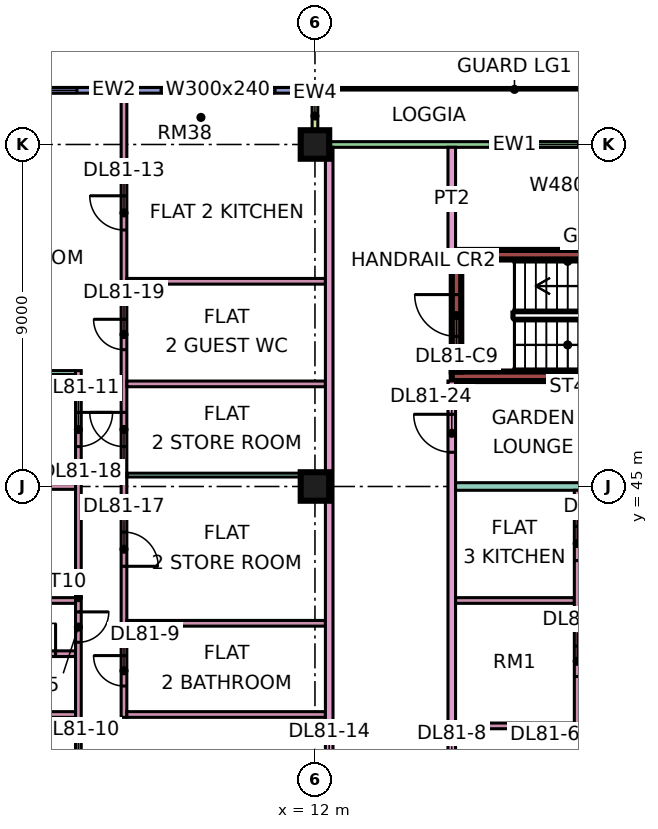
"""IFC4 building model, lengths in metres.
Left out: names, types, materials, properties, quantities, classifications, styles, units other than length and angle.
Written with IfcOpenShell. Run it as: python <this file> out.ifc"""

import sys

from ifc_helpers import new_model, si_unit, direction, frame, frame_2d, origin, origin_2d, place, context, subcontext, project, spatial, rectangle, extrude, element, fill, save


model = new_model("IFC4")
c1 = context("Model", 3, precision=1e-05, world=origin(), true_north=direction((0.0, 1.0)))
c2 = subcontext(c1, "Body", "Model", "MODEL_VIEW")
j1 = project(units=[si_unit("LENGTHUNIT", "METRE"), si_unit("PLANEANGLEUNIT", "RADIAN")], contexts=[c1])
p1 = place(None, origin())
s1 = spatial("IfcSite", under=j1, at=p1, CompositionType="ELEMENT")
p2 = place(p1, origin())
s2 = spatial("IfcBuilding", under=s1, at=p2, CompositionType="ELEMENT")
p3 = place(p2, frame((0.0, 0.0, 350.15)))
s3 = spatial("IfcBuildingStorey", under=s2, at=p3, CompositionType="ELEMENT", Elevation=350.15)
for number, where, z_axis, x_axis in (
    (1, (12.0, 45.0, 0.0), (0.0, 0.0, 1.0), (1.0, 0.0, 0.0)),
    (2, (12.0, 54.0, 0.0), (0.0, 0.0, 1.0), (1.0, 0.0, 0.0)),
):
    element("IfcColumn", number, at=place(p3, frame(where, z_axis=z_axis, x_axis=x_axis)), inside=s3, PredefinedType="COLUMN", context=c2, shape_type="SweptSolid", body=[
        extrude(rectangle(XDim=0.75, YDim=0.75, at=origin_2d()), origin(), (0.0, 0.0, 1.0), 3.75),
    ])
for number, where, z_axis, x_axis in (
    (3, (15.6, 47.9, 0.0), (0.0, 0.0, 1.0), (1.0, 0.0, 0.0)),
    (4, (15.6, 51.1, 0.0), (0.0, 0.0, 1.0), (1.0, 0.0, 0.0)),
):
    element("IfcWall", number, at=place(p3, frame(where, z_axis=z_axis, x_axis=x_axis)), inside=s3, PredefinedType="SHEAR", context=c2, shape_type="SweptSolid", body=[
        extrude(rectangle(XDim=7.0, YDim=0.25, at=frame_2d((3.5, 0.0))), origin(), (0.0, 0.0, 1.0), 3.75),
    ])
p4 = place(p3, frame((15.725, 48.025, 0.0), z_axis=(0.0, 0.0, 1.0), x_axis=(0.0, 1.0, 0.0)))
e5 = element("IfcWall", 5, at=p4, inside=s3, PredefinedType="SHEAR", context=c2, shape_type="SweptSolid", body=[
    extrude(rectangle(XDim=2.95, YDim=0.25, at=frame_2d((1.475, 0.0))), origin(), (0.0, 0.0, 1.0), 3.75),
])
p5 = place(p4, frame((0.925, 0.0, 0.0)))
e6 = element("IfcOpeningElement", 6, at=p5, cuts=e5, PredefinedType="OPENING", context=c2, shape_type="SweptSolid", body=[
    extrude(rectangle(XDim=1.1, YDim=2.2, at=frame_2d((0.55, 1.1))), frame((0.0, 0.135, 0.0), z_axis=(0.0, -1.0, 0.0), x_axis=(1.0, 0.0, 0.0)), (0.0, 0.0, 1.0), 0.27),
])
p6 = place(p3, frame((22.425, 54.0, 0.0), z_axis=(0.0, 0.0, 1.0), x_axis=(-1.0, 0.0, 0.0)))
e7 = element("IfcWall", 7, at=p6, inside=s3, PredefinedType="SOLIDWALL", context=c2, shape_type="SweptSolid", body=[
    extrude(rectangle(XDim=10.35, YDim=0.15, at=frame_2d((5.175, 0.0))), origin(), (0.0, 0.0, 1.0), 3.35),
])
p7 = place(p6, frame((1.012, 0.0, 0.45)))
e8 = element("IfcOpeningElement", 8, at=p7, cuts=e7, PredefinedType="OPENING", context=c2, shape_type="SweptSolid", body=[
    extrude(rectangle(XDim=4.8, YDim=2.4, at=frame_2d((2.4, 1.2))), frame((0.0, 0.085, 0.0), z_axis=(0.0, -1.0, 0.0), x_axis=(1.0, 0.0, 0.0)), (0.0, 0.0, 1.0), 0.17),
])
p8 = place(p3, frame((12.0, 55.5, 0.0), z_axis=(0.0, 0.0, 1.0), x_axis=(0.0, -1.0, 0.0)))
e9 = element("IfcWall", 9, at=p8, inside=s3, PredefinedType="SOLIDWALL", context=c2, shape_type="SweptSolid", body=[
    extrude(rectangle(XDim=1.5, YDim=0.15, at=frame_2d((0.75, 0.0))), origin(), (0.0, 0.0, 1.0), 3.35),
])
p9 = place(p3, frame((11.925, 55.425, 0.0), z_axis=(0.0, 0.0, 1.0), x_axis=(-1.0, 0.0, 0.0)))
e10 = element("IfcWall", 10, at=p9, inside=s3, PredefinedType="SOLIDWALL", context=c2, shape_type="SweptSolid", body=[
    extrude(rectangle(XDim=10.425, YDim=0.15, at=frame_2d((5.212, 0.0))), origin(), (0.0, 0.0, 1.0), 3.35),
])
p10 = place(p9, frame((0.975, 0.0, 0.45)))
e11 = element("IfcOpeningElement", 11, at=p10, cuts=e10, PredefinedType="OPENING", context=c2, shape_type="SweptSolid", body=[
    extrude(rectangle(XDim=3.0, YDim=2.4, at=frame_2d((1.5, 1.2))), frame((0.0, 0.085, 0.0), z_axis=(0.0, -1.0, 0.0), x_axis=(1.0, 0.0, 0.0)), (0.0, 0.0, 1.0), 0.17),
])
p11 = place(p9, frame((6.188, 0.0, 0.45)))
e12 = element("IfcOpeningElement", 12, at=p11, cuts=e10, PredefinedType="OPENING", context=c2, shape_type="SweptSolid", body=[
    extrude(rectangle(XDim=3.0, YDim=2.4, at=frame_2d((1.5, 1.2))), frame((0.0, 0.085, 0.0), z_axis=(0.0, -1.0, 0.0), x_axis=(1.0, 0.0, 0.0)), (0.0, 0.0, 1.0), 0.17),
])
p12 = place(p3, frame((0.0, 48.0, 0.0), z_axis=(0.0, 0.0, 1.0), x_axis=(1.0, 0.0, 0.0)))
e13 = element("IfcWall", 13, at=p12, inside=s3, PredefinedType="PARTITIONING", context=c2, shape_type="SweptSolid", body=[
    extrude(rectangle(XDim=5.7, YDim=0.1, at=frame_2d((2.85, 0.0))), origin(), (0.0, 0.0, 1.0), 3.35),
])
for number, where, z_axis, x_axis in (
    (14, (0.074, 39.0, 0.0), (0.0, 0.0, 1.0), (1.0, 0.0, 0.0)),
    (15, (0.074, 42.0, 0.0), (0.0, 0.0, 1.0), (1.0, 0.0, 0.0)),
):
    element("IfcWall", number, at=place(p3, frame(where, z_axis=z_axis, x_axis=x_axis)), inside=s3, PredefinedType="PARTITIONING", context=c2, shape_type="SweptSolid", body=[
        extrude(rectangle(XDim=5.626, YDim=0.15, at=frame_2d((2.813, 0.0))), origin(), (0.0, 0.0, 1.0), 3.35),
    ])
p13 = place(p3, frame((3.375, 45.0, 0.0), z_axis=(0.0, 0.0, 1.0), x_axis=(1.0, 0.0, 0.0)))
e16 = element("IfcWall", 16, at=p13, inside=s3, PredefinedType="PARTITIONING", context=c2, shape_type="SweptSolid", body=[
    extrude(rectangle(XDim=2.325, YDim=0.15, at=frame_2d((1.163, 0.0))), origin(), (0.0, 0.0, 1.0), 3.35),
])
p14 = place(p3, frame((3.7, 40.6, 0.0), z_axis=(0.0, 0.0, 1.0), x_axis=(1.0, 0.0, 0.0)))
e17 = element("IfcWall", 17, at=p14, inside=s3, PredefinedType="PARTITIONING", context=c2, shape_type="SweptSolid", body=[
    extrude(rectangle(XDim=2.0, YDim=0.15, at=frame_2d((1.0, 0.0))), origin(), (0.0, 0.0, 1.0), 3.35),
])
p15 = place(p14, frame((0.675, 0.0, 0.0)))
e18 = element("IfcOpeningElement", 18, at=p15, cuts=e17, PredefinedType="OPENING", context=c2, shape_type="SweptSolid", body=[
    extrude(rectangle(XDim=0.8, YDim=2.1, at=frame_2d((0.4, 1.05))), frame((0.0, 0.085, 0.0), z_axis=(0.0, -1.0, 0.0), x_axis=(1.0, 0.0, 0.0)), (0.0, 0.0, 1.0), 0.17),
])
p16 = place(p3, frame((5.775, 36.1, 0.0), z_axis=(0.0, 0.0, 1.0), x_axis=(0.0, 1.0, 0.0)))
e19 = element("IfcWall", 19, at=p16, inside=s3, PredefinedType="PARTITIONING", context=c2, shape_type="SweptSolid", body=[
    extrude(rectangle(XDim=11.95, YDim=0.15, at=frame_2d((5.975, 0.0))), origin(), (0.0, 0.0, 1.0), 3.35),
])
p17 = place(p16, frame((0.95, 0.0, 0.0)))
e20 = element("IfcOpeningElement", 20, at=p17, cuts=e19, PredefinedType="OPENING", context=c2, shape_type="SweptSolid", body=[
    extrude(rectangle(XDim=0.9, YDim=2.1, at=frame_2d((0.45, 1.05))), frame((0.0, 0.085, 0.0), z_axis=(0.0, -1.0, 0.0), x_axis=(1.0, 0.0, 0.0)), (0.0, 0.0, 1.0), 0.17),
])
p18 = place(p16, frame((9.95, 0.0, 0.0)))
e21 = element("IfcOpeningElement", 21, at=p18, cuts=e19, PredefinedType="OPENING", context=c2, shape_type="SweptSolid", body=[
    extrude(rectangle(XDim=0.9, YDim=2.1, at=frame_2d((0.45, 1.05))), frame((0.0, 0.085, 0.0), z_axis=(0.0, -1.0, 0.0), x_axis=(1.0, 0.0, 0.0)), (0.0, 0.0, 1.0), 0.17),
])
p19 = place(p16, frame((4.8, 0.0, 0.0)))
e22 = element("IfcOpeningElement", 22, at=p19, cuts=e19, PredefinedType="OPENING", context=c2, shape_type="SweptSolid", body=[
    extrude(rectangle(XDim=0.8, YDim=2.1, at=frame_2d((0.4, 1.05))), frame((0.0, 0.085, 0.0), z_axis=(0.0, -1.0, 0.0), x_axis=(1.0, 0.0, 0.0)), (0.0, 0.0, 1.0), 0.17),
])
p20 = place(p3, frame((6.975, 38.925, 0.0), z_axis=(0.0, 0.0, 1.0), x_axis=(0.0, 1.0, 0.0)))
e23 = element("IfcWall", 23, at=p20, inside=s3, PredefinedType="PARTITIONING", context=c2, shape_type="SweptSolid", body=[
    extrude(rectangle(XDim=16.425, YDim=0.15, at=frame_2d((8.212, 0.0))), origin(), (0.0, 0.0, 1.0), 3.35),
])
p21 = place(p20, frame((0.825, 0.0, 0.0)))
e24 = element("IfcOpeningElement", 24, at=p21, cuts=e23, PredefinedType="OPENING", context=c2, shape_type="SweptSolid", body=[
    extrude(rectangle(XDim=0.8, YDim=2.1, at=frame_2d((0.4, 1.05))), frame((0.0, 0.085, 0.0), z_axis=(0.0, -1.0, 0.0), x_axis=(1.0, 0.0, 0.0)), (0.0, 0.0, 1.0), 0.17),
])
p22 = place(p20, frame((12.825, 0.0, 0.0)))
e25 = element("IfcOpeningElement", 25, at=p22, cuts=e23, PredefinedType="OPENING", context=c2, shape_type="SweptSolid", body=[
    extrude(rectangle(XDim=0.9, YDim=2.1, at=frame_2d((0.45, 1.05))), frame((0.0, 0.085, 0.0), z_axis=(0.0, -1.0, 0.0), x_axis=(1.0, 0.0, 0.0)), (0.0, 0.0, 1.0), 0.17),
])
p23 = place(p20, frame((3.975, 0.0, 0.0)))
e26 = element("IfcOpeningElement", 26, at=p23, cuts=e23, PredefinedType="OPENING", context=c2, shape_type="SweptSolid", body=[
    extrude(rectangle(XDim=0.9, YDim=2.1, at=frame_2d((0.45, 1.05))), frame((0.0, 0.085, 0.0), z_axis=(0.0, -1.0, 0.0), x_axis=(1.0, 0.0, 0.0)), (0.0, 0.0, 1.0), 0.17),
])
p24 = place(p20, frame((7.125, 0.0, 0.0)))
e27 = element("IfcOpeningElement", 27, at=p24, cuts=e23, PredefinedType="OPENING", context=c2, shape_type="SweptSolid", body=[
    extrude(rectangle(XDim=0.9, YDim=2.1, at=frame_2d((0.45, 1.05))), frame((0.0, 0.085, 0.0), z_axis=(0.0, -1.0, 0.0), x_axis=(1.0, 0.0, 0.0)), (0.0, 0.0, 1.0), 0.17),
])
p25 = place(p20, frame((9.675, 0.0, 0.0)))
e28 = element("IfcOpeningElement", 28, at=p25, cuts=e23, PredefinedType="OPENING", context=c2, shape_type="SweptSolid", body=[
    extrude(rectangle(XDim=0.8, YDim=2.1, at=frame_2d((0.4, 1.05))), frame((0.0, 0.085, 0.0), z_axis=(0.0, -1.0, 0.0), x_axis=(1.0, 0.0, 0.0)), (0.0, 0.0, 1.0), 0.17),
])
for number, where, z_axis, x_axis in (
    (29, (7.05, 39.0, 0.0), (0.0, 0.0, 1.0), (1.0, 0.0, 0.0)),
    (30, (7.05, 41.4, 0.0), (0.0, 0.0, 1.0), (1.0, 0.0, 0.0)),
):
    element("IfcWall", number, at=place(p3, frame(where, z_axis=z_axis, x_axis=x_axis)), inside=s3, PredefinedType="PARTITIONING", context=c2, shape_type="SweptSolid", body=[
        extrude(rectangle(XDim=5.225, YDim=0.15, at=frame_2d((2.612, 0.0))), origin(), (0.0, 0.0, 1.0), 3.35),
    ])
p26 = place(p3, frame((7.05, 45.3, 0.0), z_axis=(0.0, 0.0, 1.0), x_axis=(1.0, 0.0, 0.0)))
e31 = element("IfcWall", 31, at=p26, inside=s3, PredefinedType="PARTITIONING", context=c2, shape_type="SweptSolid", body=[
    extrude(rectangle(XDim=5.225, YDim=0.1, at=frame_2d((2.612, 0.0))), origin(), (0.0, 0.0, 1.0), 3.35),
])
for number, where, z_axis, x_axis in (
    (32, (7.05, 47.7, 0.0), (0.0, 0.0, 1.0), (1.0, 0.0, 0.0)),
    (33, (7.05, 50.4, 0.0), (0.0, 0.0, 1.0), (1.0, 0.0, 0.0)),
):
    element("IfcWall", number, at=place(p3, frame(where, z_axis=z_axis, x_axis=x_axis)), inside=s3, PredefinedType="PARTITIONING", context=c2, shape_type="SweptSolid", body=[
        extrude(rectangle(XDim=5.225, YDim=0.15, at=frame_2d((2.612, 0.0))), origin(), (0.0, 0.0, 1.0), 3.35),
    ])
p27 = place(p3, frame((12.375, 20.0, 0.0), z_axis=(0.0, 0.0, 1.0), x_axis=(0.0, 1.0, 0.0)))
e34 = element("IfcWall", 34, at=p27, inside=s3, PredefinedType="PARTITIONING", context=c2, shape_type="SweptSolid", body=[
    extrude(rectangle(XDim=33.926, YDim=0.2, at=frame_2d((16.963, 0.0))), origin(), (0.0, 0.0, 1.0), 3.35),
])
p28 = place(p27, frame((16.95, 0.0, 0.0)))
e35 = element("IfcOpeningElement", 35, at=p28, cuts=e34, PredefinedType="OPENING", context=c2, shape_type="SweptSolid", body=[
    extrude(rectangle(XDim=1.0, YDim=2.1, at=frame_2d((0.5, 1.05))), frame((0.0, 0.11, 0.0), z_axis=(0.0, -1.0, 0.0), x_axis=(1.0, 0.0, 0.0)), (0.0, 0.0, 1.0), 0.22),
])
p29 = place(p27, frame((0.6, 0.0, 0.0)))
e36 = element("IfcOpeningElement", 36, at=p29, cuts=e34, PredefinedType="OPENING", context=c2, shape_type="SweptSolid", body=[
    extrude(rectangle(XDim=1.2, YDim=2.1, at=frame_2d((0.6, 1.05))), frame((0.0, 0.11, 0.0), z_axis=(0.0, -1.0, 0.0), x_axis=(1.0, 0.0, 0.0)), (0.0, 0.0, 1.0), 0.22),
])
p30 = place(p27, frame((14.25, 0.0, 0.0)))
e37 = element("IfcOpeningElement", 37, at=p30, cuts=e34, PredefinedType="OPENING", context=c2, shape_type="SweptSolid", body=[
    extrude(rectangle(XDim=1.0, YDim=2.1, at=frame_2d((0.5, 1.05))), frame((0.0, 0.11, 0.0), z_axis=(0.0, -1.0, 0.0), x_axis=(1.0, 0.0, 0.0)), (0.0, 0.0, 1.0), 0.22),
])
p31 = place(p3, frame((15.6, 20.0, 0.0), z_axis=(0.0, 0.0, 1.0), x_axis=(0.0, 1.0, 0.0)))
e38 = element("IfcWall", 38, at=p31, inside=s3, PredefinedType="PARTITIONING", context=c2, shape_type="SweptSolid", body=[
    extrude(rectangle(XDim=27.775, YDim=0.2, at=frame_2d((13.887, 0.0))), origin(), (0.0, 0.0, 1.0), 3.35),
])
p32 = place(p31, frame((6.7, 0.0, 0.0)))
e39 = element("IfcOpeningElement", 39, at=p32, cuts=e38, PredefinedType="OPENING", context=c2, shape_type="SweptSolid", body=[
    extrude(rectangle(XDim=1.6, YDim=2.1, at=frame_2d((0.8, 1.05))), frame((0.0, 0.11, 0.0), z_axis=(0.0, -1.0, 0.0), x_axis=(1.0, 0.0, 0.0)), (0.0, 0.0, 1.0), 0.22),
])
p33 = place(p31, frame((12.95, 0.0, 0.0)))
e40 = element("IfcOpeningElement", 40, at=p33, cuts=e38, PredefinedType="OPENING", context=c2, shape_type="SweptSolid", body=[
    extrude(rectangle(XDim=1.0, YDim=2.1, at=frame_2d((0.5, 1.05))), frame((0.0, 0.11, 0.0), z_axis=(0.0, -1.0, 0.0), x_axis=(1.0, 0.0, 0.0)), (0.0, 0.0, 1.0), 0.22),
])
p34 = place(p31, frame((16.9, 0.0, 0.0)))
e41 = element("IfcOpeningElement", 41, at=p34, cuts=e38, PredefinedType="OPENING", context=c2, shape_type="SweptSolid", body=[
    extrude(rectangle(XDim=1.0, YDim=2.1, at=frame_2d((0.5, 1.05))), frame((0.0, 0.11, 0.0), z_axis=(0.0, -1.0, 0.0), x_axis=(1.0, 0.0, 0.0)), (0.0, 0.0, 1.0), 0.22),
])
p35 = place(p31, frame((1.15, 0.0, 0.0)))
e42 = element("IfcOpeningElement", 42, at=p35, cuts=e38, PredefinedType="OPENING", context=c2, shape_type="SweptSolid", body=[
    extrude(rectangle(XDim=1.8, YDim=2.1, at=frame_2d((0.9, 1.05))), frame((0.0, 0.11, 0.0), z_axis=(0.0, -1.0, 0.0), x_axis=(1.0, 0.0, 0.0)), (0.0, 0.0, 1.0), 0.22),
])
p36 = place(p31, frame((25.9, 0.0, 0.0)))
e43 = element("IfcOpeningElement", 43, at=p36, cuts=e38, PredefinedType="OPENING", context=c2, shape_type="SweptSolid", body=[
    extrude(rectangle(XDim=1.0, YDim=2.1, at=frame_2d((0.5, 1.05))), frame((0.0, 0.11, 0.0), z_axis=(0.0, -1.0, 0.0), x_axis=(1.0, 0.0, 0.0)), (0.0, 0.0, 1.0), 0.22),
])
p37 = place(p3, frame((15.6, 51.225, 0.0), z_axis=(0.0, 0.0, 1.0), x_axis=(0.0, 1.0, 0.0)))
e44 = element("IfcWall", 44, at=p37, inside=s3, PredefinedType="PARTITIONING", context=c2, shape_type="SweptSolid", body=[
    extrude(rectangle(XDim=2.701, YDim=0.2, at=frame_2d((1.351, 0.0))), origin(), (0.0, 0.0, 1.0), 3.35),
])
for number, where, z_axis, x_axis in (
    (45, (15.7, 38.7, 0.0), (0.0, 0.0, 1.0), (1.0, 0.0, 0.0)),
    (46, (15.7, 42.0, 0.0), (0.0, 0.0, 1.0), (1.0, 0.0, 0.0)),
):
    element("IfcWall", number, at=place(p3, frame(where, z_axis=z_axis, x_axis=x_axis)), inside=s3, PredefinedType="PARTITIONING", context=c2, shape_type="SweptSolid", body=[
        extrude(rectangle(XDim=3.125, YDim=0.15, at=frame_2d((1.562, 0.0))), origin(), (0.0, 0.0, 1.0), 3.35),
    ])
p38 = place(p3, frame((15.7, 45.0, 0.0), z_axis=(0.0, 0.0, 1.0), x_axis=(1.0, 0.0, 0.0)))
e47 = element("IfcWall", 47, at=p38, inside=s3, PredefinedType="PARTITIONING", context=c2, shape_type="SweptSolid", body=[
    extrude(rectangle(XDim=8.226, YDim=0.2, at=frame_2d((4.113, 0.0))), origin(), (0.0, 0.0, 1.0), 3.35),
])
p39 = place(p3, frame((18.9, 38.625, 0.0), z_axis=(0.0, 0.0, 1.0), x_axis=(0.0, 1.0, 0.0)))
e48 = element("IfcWall", 48, at=p39, inside=s3, PredefinedType="PARTITIONING", context=c2, shape_type="SweptSolid", body=[
    extrude(rectangle(XDim=6.275, YDim=0.15, at=frame_2d((3.137, 0.0))), origin(), (0.0, 0.0, 1.0), 3.35),
])
p40 = place(p39, frame((1.375, 0.0, 0.0)))
e49 = element("IfcOpeningElement", 49, at=p40, cuts=e48, PredefinedType="OPENING", context=c2, shape_type="SweptSolid", body=[
    extrude(rectangle(XDim=0.8, YDim=2.1, at=frame_2d((0.4, 1.05))), frame((0.0, 0.085, 0.0), z_axis=(0.0, -1.0, 0.0), x_axis=(1.0, 0.0, 0.0)), (0.0, 0.0, 1.0), 0.17),
])
p41 = place(p39, frame((4.425, 0.0, 0.0)))
e50 = element("IfcOpeningElement", 50, at=p41, cuts=e48, PredefinedType="OPENING", context=c2, shape_type="SweptSolid", body=[
    extrude(rectangle(XDim=0.9, YDim=2.1, at=frame_2d((0.45, 1.05))), frame((0.0, 0.085, 0.0), z_axis=(0.0, -1.0, 0.0), x_axis=(1.0, 0.0, 0.0)), (0.0, 0.0, 1.0), 0.17),
])
p42 = place(p7, origin())
e51 = element("IfcWindow", 51, at=p42, inside=s3, PartitioningType="SINGLE_PANEL", PredefinedType="WINDOW", context=c2, shape_type="SweptSolid", body=[
    extrude(rectangle(XDim=4.8, YDim=2.4, at=frame_2d((2.4, 1.2))), frame((0.0, 0.03, 0.0), z_axis=(0.0, -1.0, 0.0), x_axis=(1.0, 0.0, 0.0)), (0.0, 0.0, 1.0), 0.06),
])
fill(e8, e51)
p43 = place(p10, origin())
e52 = element("IfcWindow", 52, at=p43, inside=s3, PartitioningType="SINGLE_PANEL", PredefinedType="WINDOW", context=c2, shape_type="SweptSolid", body=[
    extrude(rectangle(XDim=3.0, YDim=2.4, at=frame_2d((1.5, 1.2))), frame((0.0, 0.03, 0.0), z_axis=(0.0, -1.0, 0.0), x_axis=(1.0, 0.0, 0.0)), (0.0, 0.0, 1.0), 0.06),
])
fill(e11, e52)
p44 = place(p11, origin())
e53 = element("IfcWindow", 53, at=p44, inside=s3, PartitioningType="SINGLE_PANEL", PredefinedType="WINDOW", context=c2, shape_type="SweptSolid", body=[
    extrude(rectangle(XDim=3.0, YDim=2.4, at=frame_2d((1.5, 1.2))), frame((0.0, 0.03, 0.0), z_axis=(0.0, -1.0, 0.0), x_axis=(1.0, 0.0, 0.0)), (0.0, 0.0, 1.0), 0.06),
])
fill(e12, e53)
p45 = place(p5, frame((1.1, 0.0, 0.0), z_axis=(0.0, 0.0, 1.0), x_axis=(-1.0, 0.0, 0.0)))
e54 = element("IfcDoor", 54, at=p45, inside=s3, OperationType="SINGLE_SWING_RIGHT", PredefinedType="DOOR", context=c2, shape_type="SweptSolid", body=[
    extrude(rectangle(XDim=1.1, YDim=2.2, at=frame_2d((0.55, 1.1))), frame((0.0, 0.025, 0.0), z_axis=(0.0, -1.0, 0.0), x_axis=(1.0, 0.0, 0.0)), (0.0, 0.0, 1.0), 0.05),
])
fill(e6, e54)
p46 = place(p40, origin())
e55 = element("IfcDoor", 55, at=p46, inside=s3, OperationType="SINGLE_SWING_RIGHT", PredefinedType="DOOR", context=c2, shape_type="SweptSolid", body=[
    extrude(rectangle(XDim=0.8, YDim=2.1, at=frame_2d((0.4, 1.05))), frame((0.0, 0.025, 0.0), z_axis=(0.0, -1.0, 0.0), x_axis=(1.0, 0.0, 0.0)), (0.0, 0.0, 1.0), 0.05),
])
fill(e49, e55)
p47 = place(p41, origin())
e56 = element("IfcDoor", 56, at=p47, inside=s3, OperationType="SINGLE_SWING_RIGHT", PredefinedType="DOOR", context=c2, shape_type="SweptSolid", body=[
    extrude(rectangle(XDim=0.9, YDim=2.1, at=frame_2d((0.45, 1.05))), frame((0.0, 0.025, 0.0), z_axis=(0.0, -1.0, 0.0), x_axis=(1.0, 0.0, 0.0)), (0.0, 0.0, 1.0), 0.05),
])
fill(e50, e56)
p48 = place(p21, frame((0.8, 0.0, 0.0), z_axis=(0.0, 0.0, 1.0), x_axis=(-1.0, 0.0, 0.0)))
e57 = element("IfcDoor", 57, at=p48, inside=s3, OperationType="SINGLE_SWING_RIGHT", PredefinedType="DOOR", context=c2, shape_type="SweptSolid", body=[
    extrude(rectangle(XDim=0.8, YDim=2.1, at=frame_2d((0.4, 1.05))), frame((0.0, 0.025, 0.0), z_axis=(0.0, -1.0, 0.0), x_axis=(1.0, 0.0, 0.0)), (0.0, 0.0, 1.0), 0.05),
])
fill(e24, e57)
p49 = place(p18, origin())
e58 = element("IfcDoor", 58, at=p49, inside=s3, OperationType="SINGLE_SWING_RIGHT", PredefinedType="DOOR", context=c2, shape_type="SweptSolid", body=[
    extrude(rectangle(XDim=0.9, YDim=2.1, at=frame_2d((0.45, 1.05))), frame((0.0, 0.025, 0.0), z_axis=(0.0, -1.0, 0.0), x_axis=(1.0, 0.0, 0.0)), (0.0, 0.0, 1.0), 0.05),
])
fill(e21, e58)
p50 = place(p22, frame((0.9, 0.0, 0.0), z_axis=(0.0, 0.0, 1.0), x_axis=(-1.0, 0.0, 0.0)))
e59 = element("IfcDoor", 59, at=p50, inside=s3, OperationType="SINGLE_SWING_RIGHT", PredefinedType="DOOR", context=c2, shape_type="SweptSolid", body=[
    extrude(rectangle(XDim=0.9, YDim=2.1, at=frame_2d((0.45, 1.05))), frame((0.0, 0.025, 0.0), z_axis=(0.0, -1.0, 0.0), x_axis=(1.0, 0.0, 0.0)), (0.0, 0.0, 1.0), 0.05),
])
fill(e25, e59)
p51 = place(p19, origin())
e60 = element("IfcDoor", 60, at=p51, inside=s3, OperationType="SINGLE_SWING_RIGHT", PredefinedType="DOOR", context=c2, shape_type="SweptSolid", body=[
    extrude(rectangle(XDim=0.8, YDim=2.1, at=frame_2d((0.4, 1.05))), frame((0.0, 0.025, 0.0), z_axis=(0.0, -1.0, 0.0), x_axis=(1.0, 0.0, 0.0)), (0.0, 0.0, 1.0), 0.05),
])
fill(e22, e60)
p52 = place(p15, frame((0.8, 0.0, 0.0), z_axis=(0.0, 0.0, 1.0), x_axis=(-1.0, 0.0, 0.0)))
e61 = element("IfcDoor", 61, at=p52, inside=s3, OperationType="SINGLE_SWING_RIGHT", PredefinedType="DOOR", context=c2, shape_type="SweptSolid", body=[
    extrude(rectangle(XDim=0.8, YDim=2.1, at=frame_2d((0.4, 1.05))), frame((0.0, 0.025, 0.0), z_axis=(0.0, -1.0, 0.0), x_axis=(1.0, 0.0, 0.0)), (0.0, 0.0, 1.0), 0.05),
])
fill(e18, e61)
p53 = place(p23, frame((0.9, 0.0, 0.0), z_axis=(0.0, 0.0, 1.0), x_axis=(-1.0, 0.0, 0.0)))
e62 = element("IfcDoor", 62, at=p53, inside=s3, OperationType="SINGLE_SWING_LEFT", PredefinedType="DOOR", context=c2, shape_type="SweptSolid", body=[
    extrude(rectangle(XDim=0.9, YDim=2.1, at=frame_2d((0.45, 1.05))), frame((0.0, 0.025, 0.0), z_axis=(0.0, -1.0, 0.0), x_axis=(1.0, 0.0, 0.0)), (0.0, 0.0, 1.0), 0.05),
])
fill(e26, e62)
p54 = place(p24, frame((0.9, 0.0, 0.0), z_axis=(0.0, 0.0, 1.0), x_axis=(-1.0, 0.0, 0.0)))
e63 = element("IfcDoor", 63, at=p54, inside=s3, OperationType="SINGLE_SWING_RIGHT", PredefinedType="DOOR", context=c2, shape_type="SweptSolid", body=[
    extrude(rectangle(XDim=0.9, YDim=2.1, at=frame_2d((0.45, 1.05))), frame((0.0, 0.025, 0.0), z_axis=(0.0, -1.0, 0.0), x_axis=(1.0, 0.0, 0.0)), (0.0, 0.0, 1.0), 0.05),
])
fill(e27, e63)
p55 = place(p25, frame((0.8, 0.0, 0.0), z_axis=(0.0, 0.0, 1.0), x_axis=(-1.0, 0.0, 0.0)))
e64 = element("IfcDoor", 64, at=p55, inside=s3, OperationType="SINGLE_SWING_RIGHT", PredefinedType="DOOR", context=c2, shape_type="SweptSolid", body=[
    extrude(rectangle(XDim=0.8, YDim=2.1, at=frame_2d((0.4, 1.05))), frame((0.0, 0.025, 0.0), z_axis=(0.0, -1.0, 0.0), x_axis=(1.0, 0.0, 0.0)), (0.0, 0.0, 1.0), 0.05),
])
fill(e28, e64)
p56 = place(p36, frame((1.0, 0.0, 0.0), z_axis=(0.0, 0.0, 1.0), x_axis=(-1.0, 0.0, 0.0)))
e65 = element("IfcDoor", 65, at=p56, inside=s3, OperationType="SINGLE_SWING_RIGHT", PredefinedType="DOOR", context=c2, shape_type="SweptSolid", body=[
    extrude(rectangle(XDim=1.0, YDim=2.1, at=frame_2d((0.5, 1.05))), frame((0.0, 0.025, 0.0), z_axis=(0.0, -1.0, 0.0), x_axis=(1.0, 0.0, 0.0)), (0.0, 0.0, 1.0), 0.05),
])
fill(e43, e65)
save(model, sys.argv[1])
